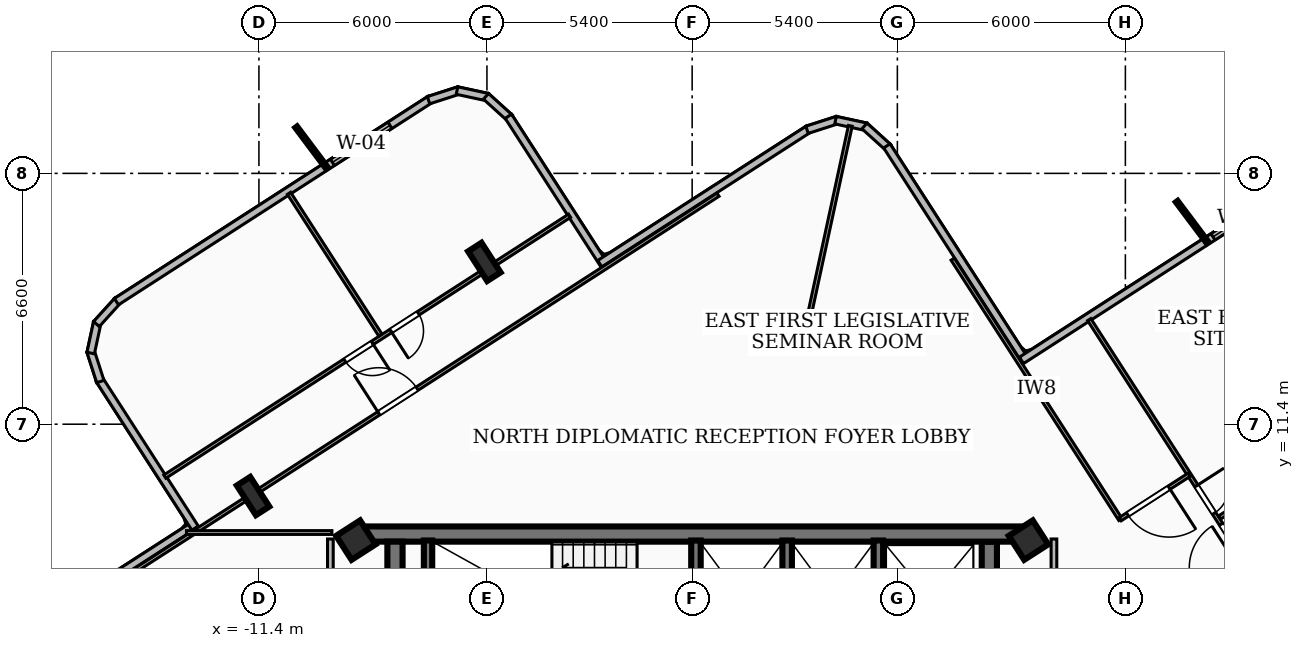
"""IFC4 building model, lengths in metres.
Left out: names, types, materials, properties, quantities, classifications, styles, units other than length and angle.
Written with IfcOpenShell. Run it as: python <this file> out.ifc"""

import sys

from ifc_helpers import new_model, si_unit, direction, frame, frame_2d, origin, origin_2d, place, context, subcontext, project, spatial, rectangle, i_section, extrude, element, fill, save


model = new_model("IFC4")
c1 = context("Model", 3, precision=1e-05, world=origin(), true_north=direction((0.0, 1.0)))
c2 = subcontext(c1, "Body", "Model", "MODEL_VIEW")
j1 = project(units=[si_unit("LENGTHUNIT", "METRE"), si_unit("PLANEANGLEUNIT", "RADIAN")], contexts=[c1])
p1 = place(None, origin())
s1 = spatial("IfcSite", under=j1, at=p1, CompositionType="ELEMENT")
p2 = place(p1, origin())
s2 = spatial("IfcBuilding", under=s1, at=p2, CompositionType="ELEMENT")
p3 = place(p2, frame((0.0, 0.0, 215.46)))
s3 = spatial("IfcBuildingStorey", under=s2, at=p3, CompositionType="ELEMENT", Elevation=215.46)
p4 = place(p3, frame((-8.78, 8.51, 0.0), z_axis=(0.0, 0.0, 1.0), x_axis=(1.0, 0.0, 0.0)))
e1 = element("IfcWall", 1, at=p4, inside=s3, PredefinedType="SHEAR", context=c2, shape_type="SweptSolid", body=[
    extrude(rectangle(XDim=17.56, YDim=0.4, at=frame_2d((8.78, 0.0))), origin(), (0.0, 0.0, 1.0), 3.16),
])
for number, where, z_axis, x_axis in (
    (2, (-7.82, 1.95, 0.0), (0.0, 0.0, 1.0), (0.0, 1.0, 0.0)),
    (3, (7.82, 8.31, 0.0), (0.0, 0.0, 1.0), (0.0, -1.0, 0.0)),
):
    element("IfcWall", number, at=place(p3, frame(where, z_axis=z_axis, x_axis=x_axis)), inside=s3, PredefinedType="SHEAR", context=c2, shape_type="SweptSolid", body=[
        extrude(rectangle(XDim=6.36, YDim=0.4, at=frame_2d((3.18, 0.0))), origin(), (0.0, 0.0, 1.0), 3.16),
    ])
p5 = place(p3, frame((-6.95, 5.28, 0.0), z_axis=(0.0, 0.0, 1.0), x_axis=(0.0, 1.0, 0.0)))
e4 = element("IfcWall", 4, at=p5, inside=s3, PredefinedType="SOLIDWALL", context=c2, shape_type="SweptSolid", body=[
    extrude(rectangle(XDim=3.06, YDim=0.22, at=frame_2d((1.53, 0.0))), origin(), (0.0, 0.0, 1.0), 3.16),
])
for number, where, z_axis, x_axis in (
    (5, (0.1, 5.3, 0.0), (0.0, 0.0, 1.0), (0.0, 1.0, 0.0)),
    (6, (2.5, 5.3, 0.0), (0.0, 0.0, 1.0), (0.0, 1.0, 0.0)),
    (7, (4.9, 5.3, 0.0), (0.0, 0.0, 1.0), (0.0, 1.0, 0.0)),
):
    element("IfcWall", number, at=place(p3, frame(where, z_axis=z_axis, x_axis=x_axis)), inside=s3, PredefinedType="SOLIDWALL", context=c2, shape_type="SweptSolid", body=[
        extrude(rectangle(XDim=3.04, YDim=0.25, at=frame_2d((1.52, 0.0))), origin(), (0.0, 0.0, 1.0), 3.16),
    ])
for number, where, z_axis, x_axis in (
    (8, (-8.85, 8.35, 0.0), (0.0, 0.0, 1.0), (0.841, 0.542, 0.0)),
    (9, (8.85, 8.35, 0.0), (0.0, 0.0, 1.0), (0.841, 0.542, 0.0)),
):
    element("IfcColumn", number, at=place(p3, frame(where, z_axis=z_axis, x_axis=x_axis)), inside=s3, PredefinedType="COLUMN", context=c2, shape_type="SweptSolid", body=[
        extrude(rectangle(XDim=0.75, YDim=0.75, at=origin_2d()), origin(), (0.0, 0.0, 1.0), 3.42),
    ])
for number, where, z_axis, x_axis in (
    (10, (-5.468, 15.671, 0.0), (0.0, 0.0, 1.0), (0.841, 0.542, 0.0)),
    (11, (-11.554, 9.51, 0.0), (0.0, 0.0, 1.0), (0.841, 0.542, 0.0)),
):
    element("IfcColumn", number, at=place(p3, frame(where, z_axis=z_axis, x_axis=x_axis)), inside=s3, PredefinedType="COLUMN", context=c2, shape_type="SweptSolid", body=[
        extrude(i_section(OverallWidth=0.418, OverallDepth=0.927, WebThickness=0.019, FlangeThickness=0.032, at=origin_2d()), origin(), (0.0, 0.0, 1.0), 3.42),
    ])
p6 = place(p3, frame((-18.723, 5.124, 0.0), z_axis=(0.0, 0.0, 1.0), x_axis=(0.840584959151, 0.541679726821, 0.0)))
e12 = element("IfcWall", 12, at=p6, inside=s3, PredefinedType="SOLIDWALL", context=c2, shape_type="SweptSolid", body=[
    extrude(rectangle(XDim=6.742, YDim=0.2, at=frame_2d((3.371, 0.0))), origin(), (0.0, 0.0, 1.0), 3.16),
])
p7 = place(p3, frame((-13.08, 8.666, 0.0), z_axis=(0.0, 0.0, 1.0), x_axis=(-0.541732711374, 0.840550813114, 0.0)))
e13 = element("IfcWall", 13, at=p7, inside=s3, PredefinedType="SOLIDWALL", context=c2, shape_type="SweptSolid", body=[
    extrude(rectangle(XDim=4.642, YDim=0.2, at=frame_2d((2.321, 0.0))), origin(), (0.0, 0.0, 1.0), 3.16),
])
p8 = place(p3, frame((-15.573, 12.523, 0.0), z_axis=(0.0, 0.0, 1.0), x_axis=(-0.306602907463, 0.951837516142, 0.0)))
e14 = element("IfcWall", 14, at=p8, inside=s3, PredefinedType="SOLIDWALL", context=c2, shape_type="SweptSolid", body=[
    extrude(rectangle(XDim=0.838, YDim=0.2, at=frame_2d((0.419, 0.0))), origin(), (0.0, 0.0, 1.0), 3.16),
])
p9 = place(p3, frame((-15.827, 13.273, 0.0), z_axis=(0.0, 0.0, 1.0), x_axis=(0.210782404691, 0.977533006027, 0.0)))
e15 = element("IfcWall", 15, at=p9, inside=s3, PredefinedType="SOLIDWALL", context=c2, shape_type="SweptSolid", body=[
    extrude(rectangle(XDim=0.825, YDim=0.2, at=frame_2d((0.412, 0.0))), origin(), (0.0, 0.0, 1.0), 3.16),
])
p10 = place(p3, frame((-15.675, 14.036, 0.0), z_axis=(0.0, 0.0, 1.0), x_axis=(0.671019988703, 0.741439258983, 0.0)))
e16 = element("IfcWall", 16, at=p10, inside=s3, PredefinedType="SOLIDWALL", context=c2, shape_type="SweptSolid", body=[
    extrude(rectangle(XDim=0.839, YDim=0.2, at=frame_2d((0.419, 0.0))), origin(), (0.0, 0.0, 1.0), 3.16),
])
p11 = place(p3, frame((-15.15, 14.625, 0.0), z_axis=(0.0, 0.0, 1.0), x_axis=(0.84055619882, 0.541724354839, 0.0)))
e17 = element("IfcWall", 17, at=p11, inside=s3, PredefinedType="SOLIDWALL", context=c2, shape_type="SweptSolid", body=[
    extrude(rectangle(XDim=9.824, YDim=0.2, at=frame_2d((4.912, 0.0))), origin(), (0.0, 0.0, 1.0), 3.16),
])
p12 = place(p11, frame((6.763, 0.0, 0.85)))
e18 = element("IfcOpeningElement", 18, at=p12, cuts=e17, PredefinedType="OPENING", context=c2, shape_type="SweptSolid", body=[
    extrude(rectangle(XDim=1.8, YDim=2.0, at=frame_2d((0.9, 1.0))), frame((0.0, 0.11, 0.0), z_axis=(0.0, -1.0, 0.0), x_axis=(1.0, 0.0, 0.0)), (0.0, 0.0, 1.0), 0.22),
])
p13 = place(p3, frame((-6.937, 19.925, 0.0), z_axis=(0.0, 0.0, 1.0), x_axis=(0.951922461344, 0.306339072907, 0.0)))
e19 = element("IfcWall", 19, at=p13, inside=s3, PredefinedType="SOLIDWALL", context=c2, shape_type="SweptSolid", body=[
    extrude(rectangle(XDim=0.838, YDim=0.2, at=frame_2d((0.419, 0.0))), origin(), (0.0, 0.0, 1.0), 3.16),
])
p14 = place(p3, frame((-6.187, 20.179, 0.0), z_axis=(0.0, 0.0, 1.0), x_axis=(0.977405889656, -0.211371064399, 0.0)))
e20 = element("IfcWall", 20, at=p14, inside=s3, PredefinedType="SOLIDWALL", context=c2, shape_type="SweptSolid", body=[
    extrude(rectangle(XDim=0.823, YDim=0.2, at=frame_2d((0.412, 0.0))), origin(), (0.0, 0.0, 1.0), 3.16),
])
p15 = place(p3, frame((-5.425, 20.027, 0.0), z_axis=(0.0, 0.0, 1.0), x_axis=(0.741439258983, -0.671019988703, 0.0)))
e21 = element("IfcWall", 21, at=p15, inside=s3, PredefinedType="SOLIDWALL", context=c2, shape_type="SweptSolid", body=[
    extrude(rectangle(XDim=0.839, YDim=0.2, at=frame_2d((0.419, 0.0))), origin(), (0.0, 0.0, 1.0), 3.16),
])
p16 = place(p3, frame((-4.836, 19.502, 0.0), z_axis=(0.0, 0.0, 1.0), x_axis=(0.541756659411, -0.840535378187, 0.0)))
e22 = element("IfcWall", 22, at=p16, inside=s3, PredefinedType="SOLIDWALL", context=c2, shape_type="SweptSolid", body=[
    extrude(rectangle(XDim=4.642, YDim=0.2, at=frame_2d((2.321, 0.0))), origin(), (0.0, 0.0, 1.0), 3.16),
])
p17 = place(p3, frame((-2.431, 15.624, 0.0), z_axis=(0.0, 0.0, 1.0), x_axis=(0.840561972283, 0.541715396451, 0.0)))
e23 = element("IfcWall", 23, at=p17, inside=s3, PredefinedType="SOLIDWALL", context=c2, shape_type="SweptSolid", body=[
    extrude(rectangle(XDim=6.542, YDim=0.2, at=frame_2d((3.271, 0.0))), origin(), (0.0, 0.0, 1.0), 3.16),
])
p18 = place(p3, frame((3.023, 19.146, 0.0), z_axis=(0.0, 0.0, 1.0), x_axis=(0.951837516142, 0.306602907463, 0.0)))
e24 = element("IfcWall", 24, at=p18, inside=s3, PredefinedType="SOLIDWALL", context=c2, shape_type="SweptSolid", body=[
    extrude(rectangle(XDim=0.838, YDim=0.2, at=frame_2d((0.419, 0.0))), origin(), (0.0, 0.0, 1.0), 3.16),
])
p19 = place(p3, frame((3.773, 19.4, 0.0), z_axis=(0.0, 0.0, 1.0), x_axis=(0.977467098281, -0.211087829535, 0.0)))
e25 = element("IfcWall", 25, at=p19, inside=s3, PredefinedType="SOLIDWALL", context=c2, shape_type="SweptSolid", body=[
    extrude(rectangle(XDim=0.823, YDim=0.2, at=frame_2d((0.412, 0.0))), origin(), (0.0, 0.0, 1.0), 3.16),
])
p20 = place(p3, frame((4.535, 19.248, 0.0), z_axis=(0.0, 0.0, 1.0), x_axis=(0.741439258983, -0.671019988703, 0.0)))
e26 = element("IfcWall", 26, at=p20, inside=s3, PredefinedType="SOLIDWALL", context=c2, shape_type="SweptSolid", body=[
    extrude(rectangle(XDim=0.839, YDim=0.2, at=frame_2d((0.419, 0.0))), origin(), (0.0, 0.0, 1.0), 3.16),
])
p21 = place(p3, frame((5.124, 18.723, 0.0), z_axis=(0.0, 0.0, 1.0), x_axis=(0.541679726821, -0.840584959151, 0.0)))
e27 = element("IfcWall", 27, at=p21, inside=s3, PredefinedType="SOLIDWALL", context=c2, shape_type="SweptSolid", body=[
    extrude(rectangle(XDim=6.742, YDim=0.2, at=frame_2d((3.371, 0.0))), origin(), (0.0, 0.0, 1.0), 3.16),
])
p22 = place(p3, frame((8.666, 13.08, 0.0), z_axis=(0.0, 0.0, 1.0), x_axis=(0.840540020681, 0.541749456515, 0.0)))
e28 = element("IfcWall", 28, at=p22, inside=s3, PredefinedType="SOLIDWALL", context=c2, shape_type="SweptSolid", body=[
    extrude(rectangle(XDim=8.842, YDim=0.2, at=frame_2d((4.421, 0.0))), origin(), (0.0, 0.0, 1.0), 3.16),
])
p23 = place(p22, frame((5.997, 0.0, 0.85)))
e29 = element("IfcOpeningElement", 29, at=p23, cuts=e28, PredefinedType="OPENING", context=c2, shape_type="SweptSolid", body=[
    extrude(rectangle(XDim=1.8, YDim=2.0, at=frame_2d((0.9, 1.0))), frame((0.0, 0.11, 0.0), z_axis=(0.0, -1.0, 0.0), x_axis=(1.0, 0.0, 0.0)), (0.0, 0.0, 1.0), 0.22),
])
p24 = place(p3, frame((-9.52, 1.75, 0.0), z_axis=(0.0, 0.0, 1.0), x_axis=(0.0, 1.0, 0.0)))
e30 = element("IfcWall", 30, at=p24, inside=s3, PredefinedType="PARTITIONING", context=c2, shape_type="SweptSolid", body=[
    extrude(rectangle(XDim=6.63, YDim=0.15, at=frame_2d((3.315, 0.0))), origin(), (0.0, 0.0, 1.0), 3.16),
])
p25 = place(p3, frame((9.52, 1.75, 0.0), z_axis=(0.0, 0.0, 1.0), x_axis=(0.0, 1.0, 0.0)))
e31 = element("IfcWall", 31, at=p25, inside=s3, PredefinedType="PARTITIONING", context=c2, shape_type="SweptSolid", body=[
    extrude(rectangle(XDim=6.63, YDim=0.15, at=frame_2d((3.315, 0.0))), origin(), (0.0, 0.0, 1.0), 2.53),
])
p26 = place(p3, frame((-13.306, 8.55, 0.0), z_axis=(0.0, 0.0, 1.0), x_axis=(1.0, 0.0, 0.0)))
e32 = element("IfcWall", 32, at=p26, inside=s3, PredefinedType="PARTITIONING", context=c2, shape_type="SweptSolid", body=[
    extrude(rectangle(XDim=3.826, YDim=0.1, at=frame_2d((1.913, 0.0))), origin(), (0.0, 0.0, 1.0), 2.53),
])
p27 = place(p3, frame((2.927, 13.54, 0.0), z_axis=(0.0, 0.0, 1.0), x_axis=(0.21141803497, 0.977395730751, 0.0)))
e33 = element("IfcWall", 33, at=p27, inside=s3, PredefinedType="PARTITIONING", context=c2, shape_type="SweptSolid", body=[
    extrude(rectangle(XDim=5.842, YDim=0.1, at=frame_2d((2.921, 0.0))), origin(), (0.0, 0.0, 1.0), 3.16),
])
p28 = place(p3, frame((11.27, 8.893, 0.0), z_axis=(0.0, 0.0, 1.0), x_axis=(-0.541761070726, 0.840532534912, 0.0)))
e34 = element("IfcWall", 34, at=p28, inside=s3, PredefinedType="PARTITIONING", context=c2, shape_type="SweptSolid", body=[
    extrude(rectangle(XDim=8.149, YDim=0.1, at=frame_2d((4.075, 0.0))), origin(), (0.0, 0.0, 1.0), 2.53),
])
p29 = place(p3, frame((13.08, 10.071, 0.0), z_axis=(0.0, 0.0, 1.0), x_axis=(-0.840623628822, -0.541619714067, 0.0)))
e35 = element("IfcWall", 35, at=p29, inside=s3, PredefinedType="PARTITIONING", context=c2, shape_type="SweptSolid", body=[
    extrude(rectangle(XDim=2.16, YDim=0.1, at=frame_2d((1.08, 0.0))), origin(), (0.0, 0.0, 1.0), 3.16),
])
p30 = place(p29, frame((0.63, 0.0, 0.0)))
e36 = element("IfcOpeningElement", 36, at=p30, cuts=e35, PredefinedType="OPENING", context=c2, shape_type="SweptSolid", body=[
    extrude(rectangle(XDim=1.3, YDim=2.1, at=frame_2d((0.65, 1.05))), frame((0.0, 0.06, 0.0), z_axis=(0.0, -1.0, 0.0), x_axis=(1.0, 0.0, 0.0)), (0.0, 0.0, 1.0), 0.12),
])
p31 = place(p3, frame((12.759, 6.581, 0.0), z_axis=(0.0, 0.0, 1.0), x_axis=(0.840641931508, 0.541591306236, 0.0)))
e37 = element("IfcWall", 37, at=p31, inside=s3, PredefinedType="PARTITIONING", context=c2, shape_type="SweptSolid", body=[
    extrude(rectangle(XDim=2.16, YDim=0.1, at=frame_2d((1.08, 0.0))), origin(), (0.0, 0.0, 1.0), 3.16),
])
p32 = place(p31, frame((0.63, 0.0, 0.0)))
e38 = element("IfcOpeningElement", 38, at=p32, cuts=e37, PredefinedType="OPENING", context=c2, shape_type="SweptSolid", body=[
    extrude(rectangle(XDim=1.3, YDim=2.1, at=frame_2d((0.65, 1.05))), frame((0.0, 0.06, 0.0), z_axis=(0.0, -1.0, 0.0), x_axis=(1.0, 0.0, 0.0)), (0.0, 0.0, 1.0), 0.12),
])
p33 = place(p3, frame((13.878, 8.944, 0.0), z_axis=(0.0, 0.0, 1.0), x_axis=(0.840576508336, 0.541692840671, 0.0)))
e39 = element("IfcWall", 39, at=p33, inside=s3, PredefinedType="PARTITIONING", context=c2, shape_type="SweptSolid", body=[
    extrude(rectangle(XDim=8.124, YDim=0.1, at=frame_2d((4.062, 0.0))), origin(), (0.0, 0.0, 1.0), 2.689),
])
p34 = place(p3, frame((10.449, 14.152, 0.0), z_axis=(0.0, 0.0, 1.0), x_axis=(0.541734007753, -0.8405499776, 0.0)))
e40 = element("IfcWall", 40, at=p34, inside=s3, PredefinedType="PARTITIONING", context=c2, shape_type="SweptSolid", body=[
    extrude(rectangle(XDim=12.67, YDim=0.1, at=frame_2d((6.335, 0.0))), origin(), (0.0, 0.0, 1.0), 2.53),
])
p35 = place(p34, frame((6.405, 0.0, 0.0)))
e41 = element("IfcOpeningElement", 41, at=p35, cuts=e40, PredefinedType="OPENING", context=c2, shape_type="SweptSolid", body=[
    extrude(rectangle(XDim=0.86, YDim=2.04, at=frame_2d((0.43, 1.02))), frame((0.0, 0.06, 0.0), z_axis=(0.0, -1.0, 0.0), x_axis=(1.0, 0.0, 0.0)), (0.0, 0.0, 1.0), 0.12),
])
p36 = place(p34, frame((5.205, 0.0, 0.0)))
e42 = element("IfcOpeningElement", 42, at=p36, cuts=e40, PredefinedType="OPENING", context=c2, shape_type="SweptSolid", body=[
    extrude(rectangle(XDim=0.86, YDim=2.04, at=frame_2d((0.43, 1.02))), frame((0.0, 0.06, 0.0), z_axis=(0.0, -1.0, 0.0), x_axis=(1.0, 0.0, 0.0)), (0.0, 0.0, 1.0), 0.12),
])
p37 = place(p3, frame((-16.331, 6.476, 0.0), z_axis=(0.0, 0.0, 1.0), x_axis=(0.840579457381, 0.541688264437, 0.0)))
e43 = element("IfcWall", 43, at=p37, inside=s3, PredefinedType="PARTITIONING", context=c2, shape_type="SweptSolid", body=[
    extrude(rectangle(XDim=20.238, YDim=0.1, at=frame_2d((10.119, 0.0))), origin(), (0.0, 0.0, 1.0), 2.53),
])
p38 = place(p37, frame((9.619, 0.0, 0.0)))
e44 = element("IfcOpeningElement", 44, at=p38, cuts=e43, PredefinedType="OPENING", context=c2, shape_type="SweptSolid", body=[
    extrude(rectangle(XDim=1.2, YDim=2.1, at=frame_2d((0.6, 1.05))), frame((0.0, 0.06, 0.0), z_axis=(0.0, -1.0, 0.0), x_axis=(1.0, 0.0, 0.0)), (0.0, 0.0, 1.0), 0.12),
])
p39 = place(p3, frame((-8.205, 13.747, 0.0), z_axis=(0.0, 0.0, 1.0), x_axis=(-0.541753189494, 0.840537614669, 0.0)))
e45 = element("IfcWall", 45, at=p39, inside=s3, PredefinedType="PARTITIONING", context=c2, shape_type="SweptSolid", body=[
    extrude(rectangle(XDim=4.435, YDim=0.1, at=frame_2d((2.218, 0.0))), origin(), (0.0, 0.0, 1.0), 3.16),
])
p40 = place(p3, frame((-3.226, 16.884, 0.0), z_axis=(0.0, 0.0, 1.0), x_axis=(-0.840579419228, -0.541688323642, 0.0)))
e46 = element("IfcWall", 46, at=p40, inside=s3, PredefinedType="PARTITIONING", context=c2, shape_type="SweptSolid", body=[
    extrude(rectangle(XDim=12.67, YDim=0.1, at=frame_2d((6.335, 0.0))), origin(), (0.0, 0.0, 1.0), 2.53),
])
p41 = place(p40, frame((4.735, 0.0, 0.0)))
e47 = element("IfcOpeningElement", 47, at=p41, cuts=e46, PredefinedType="OPENING", context=c2, shape_type="SweptSolid", body=[
    extrude(rectangle(XDim=0.86, YDim=2.04, at=frame_2d((0.43, 1.02))), frame((0.0, 0.06, 0.0), z_axis=(0.0, -1.0, 0.0), x_axis=(1.0, 0.0, 0.0)), (0.0, 0.0, 1.0), 0.12),
])
p42 = place(p40, frame((6.175, 0.0, 0.0)))
e48 = element("IfcOpeningElement", 48, at=p42, cuts=e46, PredefinedType="OPENING", context=c2, shape_type="SweptSolid", body=[
    extrude(rectangle(XDim=0.86, YDim=2.04, at=frame_2d((0.43, 1.02))), frame((0.0, 0.06, 0.0), z_axis=(0.0, -1.0, 0.0), x_axis=(1.0, 0.0, 0.0)), (0.0, 0.0, 1.0), 0.12),
])
p43 = place(p12, origin())
e49 = element("IfcWindow", 49, at=p43, inside=s3, PartitioningType="SINGLE_PANEL", PredefinedType="WINDOW", context=c2, shape_type="SweptSolid", body=[
    extrude(rectangle(XDim=1.8, YDim=2.0, at=frame_2d((0.9, 1.0))), frame((0.0, 0.03, 0.0), z_axis=(0.0, -1.0, 0.0), x_axis=(1.0, 0.0, 0.0)), (0.0, 0.0, 1.0), 0.06),
])
fill(e18, e49)
p44 = place(p23, origin())
e50 = element("IfcWindow", 50, at=p44, inside=s3, PartitioningType="SINGLE_PANEL", PredefinedType="WINDOW", context=c2, shape_type="SweptSolid", body=[
    extrude(rectangle(XDim=1.8, YDim=2.0, at=frame_2d((0.9, 1.0))), frame((0.0, 0.03, 0.0), z_axis=(0.0, -1.0, 0.0), x_axis=(1.0, 0.0, 0.0)), (0.0, 0.0, 1.0), 0.06),
])
fill(e29, e50)
p45 = place(p30, origin())
e51 = element("IfcDoor", 51, at=p45, inside=s3, OperationType="SINGLE_SWING_LEFT", PredefinedType="DOOR", context=c2, shape_type="SweptSolid", body=[
    extrude(rectangle(XDim=1.3, YDim=2.1, at=frame_2d((0.65, 1.05))), frame((0.0, 0.025, 0.0), z_axis=(0.0, -1.0, 0.0), x_axis=(1.0, 0.0, 0.0)), (0.0, 0.0, 1.0), 0.05),
])
fill(e36, e51)
p46 = place(p32, origin())
e52 = element("IfcDoor", 52, at=p46, inside=s3, OperationType="SINGLE_SWING_RIGHT", PredefinedType="DOOR", context=c2, shape_type="SweptSolid", body=[
    extrude(rectangle(XDim=1.3, YDim=2.1, at=frame_2d((0.65, 1.05))), frame((0.0, 0.025, 0.0), z_axis=(0.0, -1.0, 0.0), x_axis=(1.0, 0.0, 0.0)), (0.0, 0.0, 1.0), 0.05),
])
fill(e38, e52)
p47 = place(p35, origin())
e53 = element("IfcDoor", 53, at=p47, inside=s3, OperationType="SINGLE_SWING_RIGHT", PredefinedType="DOOR", context=c2, shape_type="SweptSolid", body=[
    extrude(rectangle(XDim=0.86, YDim=2.04, at=frame_2d((0.43, 1.02))), frame((0.0, 0.025, 0.0), z_axis=(0.0, -1.0, 0.0), x_axis=(1.0, 0.0, 0.0)), (0.0, 0.0, 1.0), 0.05),
])
fill(e41, e53)
p48 = place(p36, origin())
e54 = element("IfcDoor", 54, at=p48, inside=s3, OperationType="SINGLE_SWING_LEFT", PredefinedType="DOOR", context=c2, shape_type="SweptSolid", body=[
    extrude(rectangle(XDim=0.86, YDim=2.04, at=frame_2d((0.43, 1.02))), frame((0.0, 0.025, 0.0), z_axis=(0.0, -1.0, 0.0), x_axis=(1.0, 0.0, 0.0)), (0.0, 0.0, 1.0), 0.05),
])
fill(e42, e54)
p49 = place(p38, origin())
e55 = element("IfcDoor", 55, at=p49, inside=s3, OperationType="SINGLE_SWING_LEFT", PredefinedType="DOOR", context=c2, shape_type="SweptSolid", body=[
    extrude(rectangle(XDim=1.2, YDim=2.1, at=frame_2d((0.6, 1.05))), frame((0.0, 0.025, 0.0), z_axis=(0.0, -1.0, 0.0), x_axis=(1.0, 0.0, 0.0)), (0.0, 0.0, 1.0), 0.05),
])
fill(e44, e55)
p50 = place(p41, origin())
e56 = element("IfcDoor", 56, at=p50, inside=s3, OperationType="SINGLE_SWING_RIGHT", PredefinedType="DOOR", context=c2, shape_type="SweptSolid", body=[
    extrude(rectangle(XDim=0.86, YDim=2.04, at=frame_2d((0.43, 1.02))), frame((0.0, 0.025, 0.0), z_axis=(0.0, -1.0, 0.0), x_axis=(1.0, 0.0, 0.0)), (0.0, 0.0, 1.0), 0.05),
])
fill(e47, e56)
p51 = place(p42, origin())
e57 = element("IfcDoor", 57, at=p51, inside=s3, OperationType="SINGLE_SWING_LEFT", PredefinedType="DOOR", context=c2, shape_type="SweptSolid", body=[
    extrude(rectangle(XDim=0.86, YDim=2.04, at=frame_2d((0.43, 1.02))), frame((0.0, 0.025, 0.0), z_axis=(0.0, -1.0, 0.0), x_axis=(1.0, 0.0, 0.0)), (0.0, 0.0, 1.0), 0.05),
])
fill(e48, e57)
save(model, sys.argv[1])
